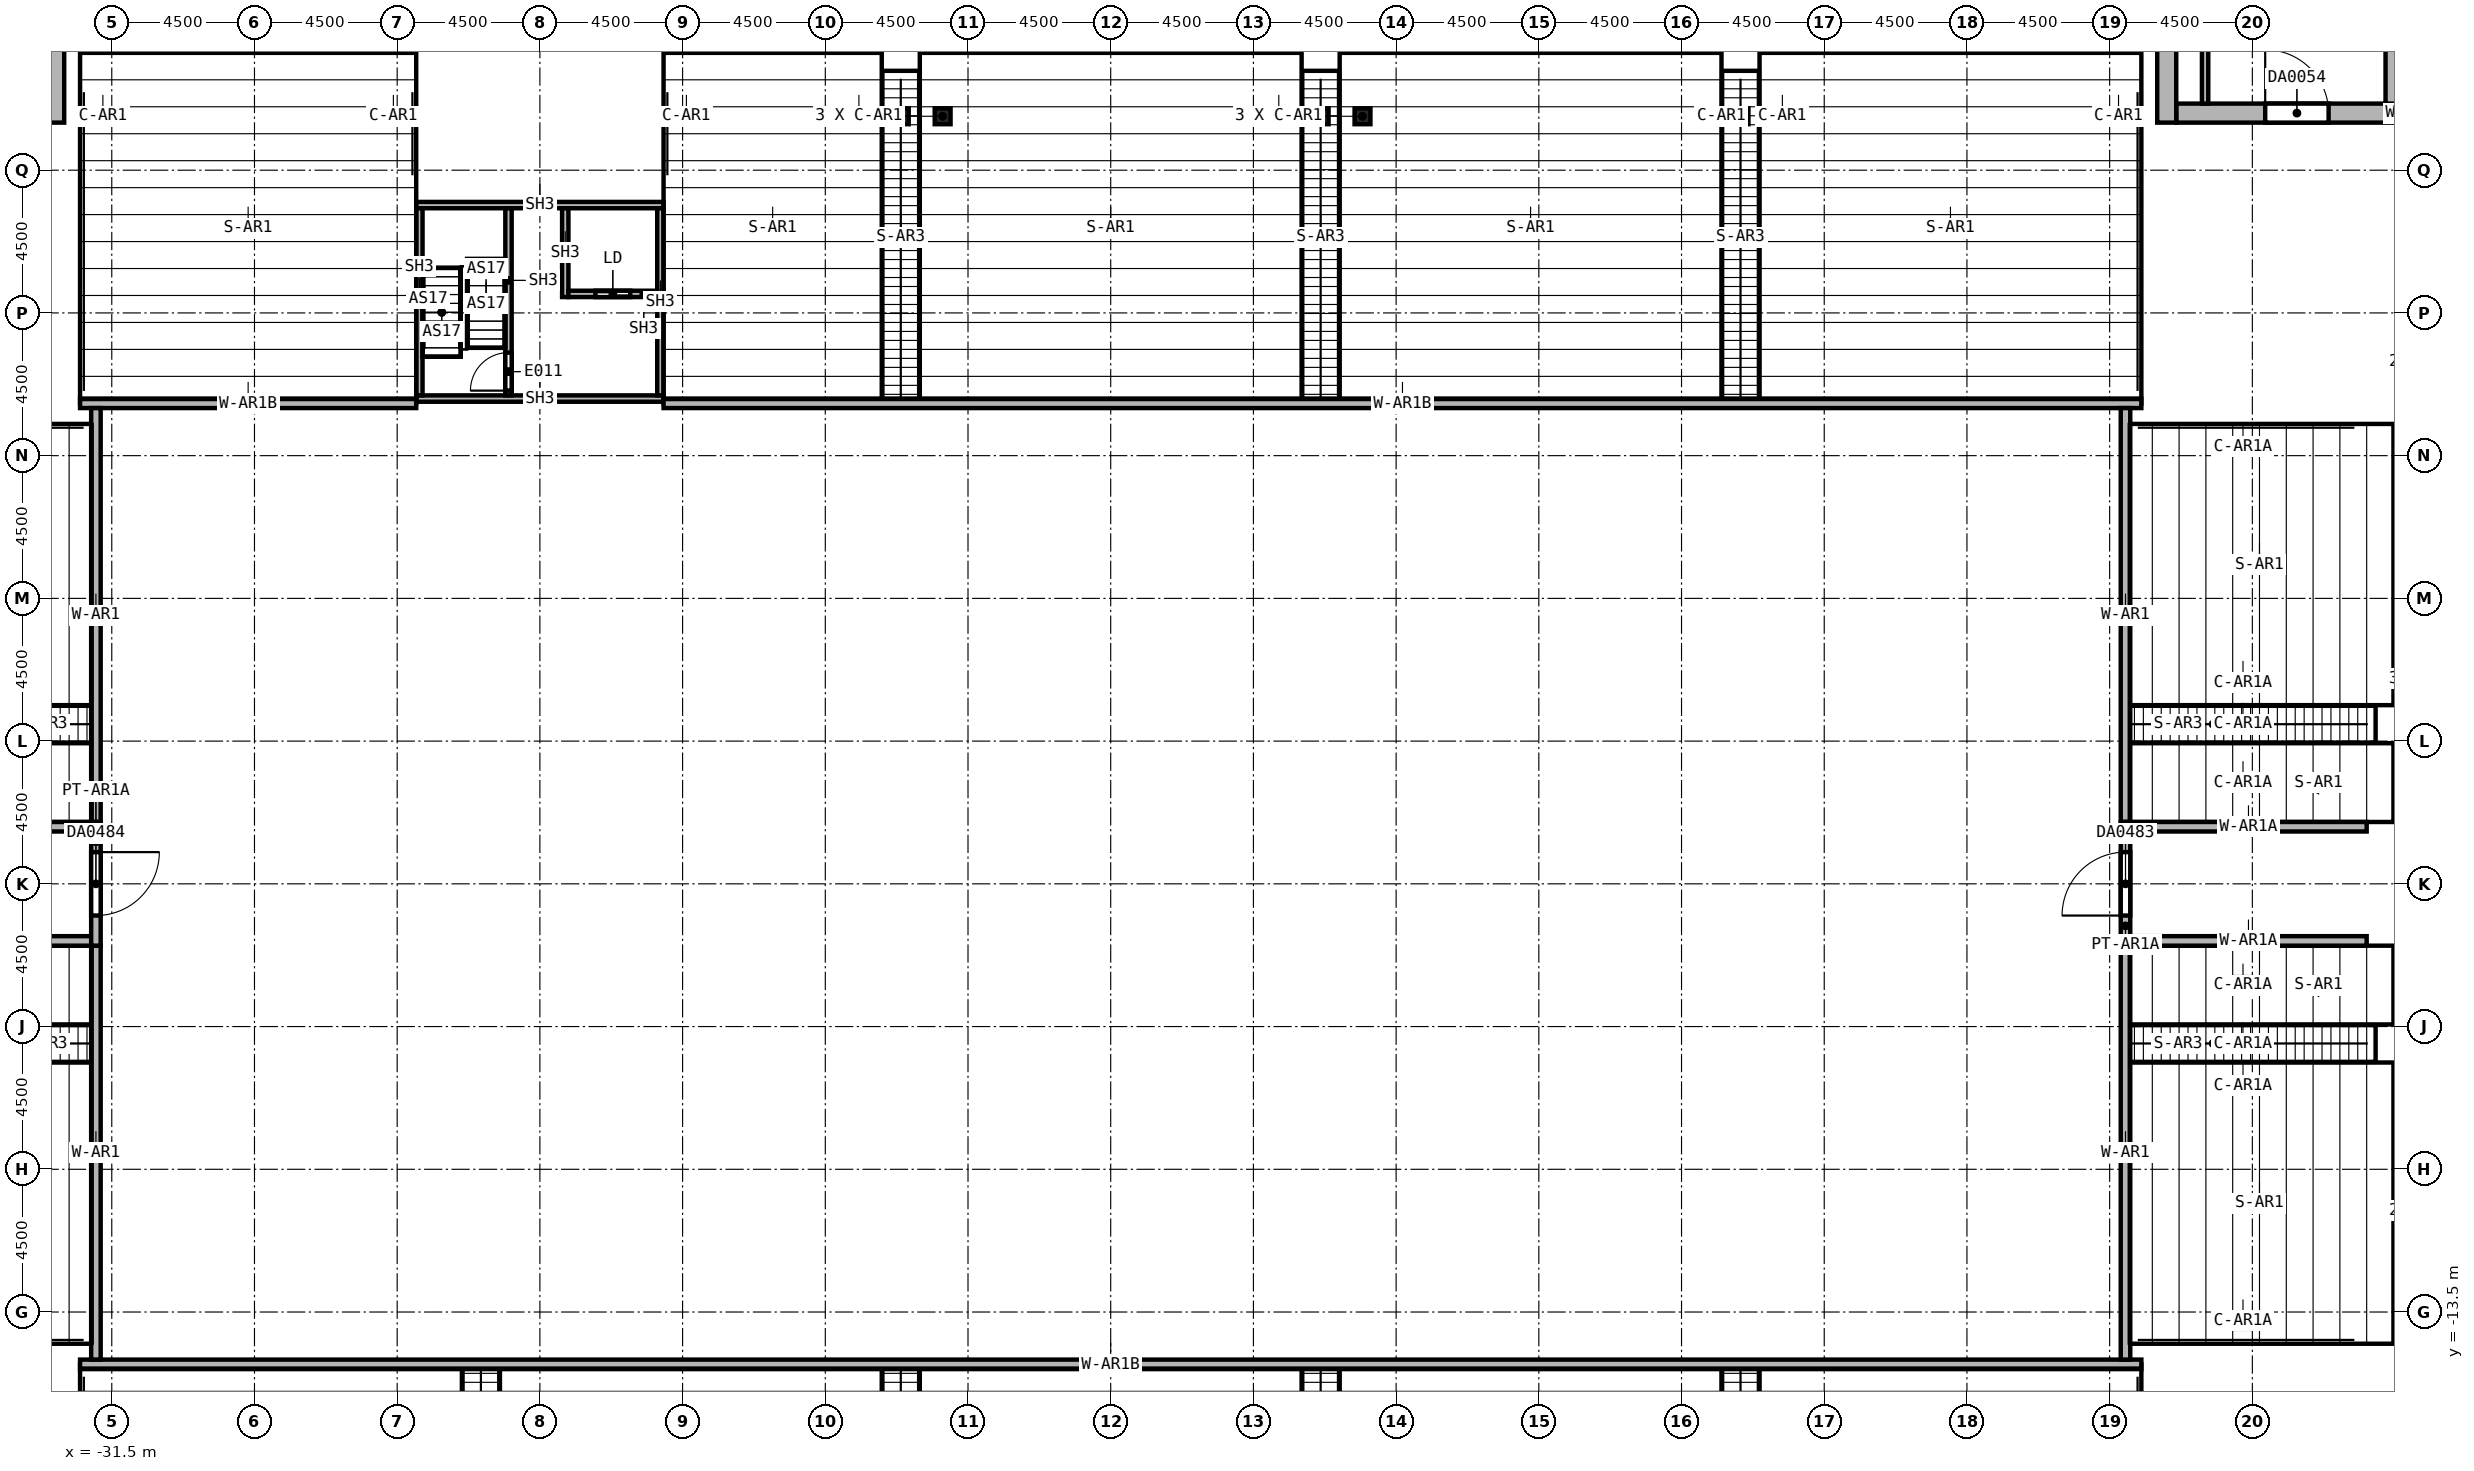
"""IFC4 building model, lengths in metres.
Left out: names, types, materials, properties, quantities, classifications, styles, units other than length and angle.
Written with IfcOpenShell. Run it as: python <this file> out.ifc"""

import sys

from ifc_helpers import new_model, si_unit, direction, frame, frame_2d, origin, origin_2d, place, context, subcontext, project, spatial, rectangle, hollow_rectangle, extrude, element, fill, save


model = new_model("IFC4")
c1 = context("Model", 3, precision=1e-05, world=origin(), true_north=direction((0.0, 1.0)))
c2 = subcontext(c1, "Body", "Model", "MODEL_VIEW")
j1 = project(units=[si_unit("LENGTHUNIT", "METRE"), si_unit("PLANEANGLEUNIT", "RADIAN")], contexts=[c1])
p1 = place(None, origin())
s1 = spatial("IfcSite", under=j1, at=p1, CompositionType="ELEMENT")
p2 = place(p1, origin())
s2 = spatial("IfcBuilding", under=s1, at=p2, CompositionType="ELEMENT")
p3 = place(p2, frame((0.0, 0.0, 12.0)))
s3 = spatial("IfcBuildingStorey", under=s2, at=p3, CompositionType="ELEMENT", Elevation=12.0)
p4 = place(p3, frame((33.6, 24.3, 0.0), z_axis=(0.0, 0.0, 1.0), x_axis=(1.0, 0.0, 0.0)))
e1 = element("IfcWall", 1, at=p4, inside=s3, PredefinedType="SHEAR", context=c2, shape_type="SweptSolid", body=[
    extrude(rectangle(XDim=13.8, YDim=0.6, at=frame_2d((6.9, 0.0))), origin(), (0.0, 0.0, 1.0), 7.0),
])
p5 = place(p4, frame((2.805, 0.0, 0.0)))
e2 = element("IfcOpeningElement", 2, at=p5, cuts=e1, PredefinedType="OPENING", context=c2, shape_type="SweptSolid", body=[
    extrude(rectangle(XDim=2.0, YDim=2.4, at=frame_2d((1.0, 1.2))), frame((0.0, 0.3, 0.0), z_axis=(0.0, -1.0, 0.0), x_axis=(1.0, 0.0, 0.0)), (0.0, 0.0, 1.0), 0.6),
])
p6 = place(p4, frame((8.995, 0.0, 0.0)))
e3 = element("IfcOpeningElement", 3, at=p6, cuts=e1, PredefinedType="OPENING", context=c2, shape_type="SweptSolid", body=[
    extrude(rectangle(XDim=2.0, YDim=2.4, at=frame_2d((1.0, 1.2))), frame((0.0, 0.3, 0.0), z_axis=(0.0, -1.0, 0.0), x_axis=(1.0, 0.0, 0.0)), (0.0, 0.0, 1.0), 0.6),
])
p7 = place(p3, frame((33.3, 24.0, 0.0), z_axis=(0.0, 0.0, 1.0), x_axis=(0.0, 1.0, 0.0)))
e4 = element("IfcWall", 4, at=p7, inside=s3, PredefinedType="SHEAR", context=c2, shape_type="SweptSolid", body=[
    extrude(rectangle(XDim=15.0, YDim=0.6, at=frame_2d((7.5, 0.0))), origin(), (0.0, 0.0, 1.0), 7.0),
])
p8 = place(p7, frame((10.05, 0.0, 0.0)))
e5 = element("IfcOpeningElement", 5, at=p8, cuts=e4, PredefinedType="OPENING", context=c2, shape_type="SweptSolid", body=[
    extrude(rectangle(XDim=2.0, YDim=2.4, at=frame_2d((1.0, 1.2))), frame((0.0, 0.3, 0.0), z_axis=(0.0, -1.0, 0.0), x_axis=(1.0, 0.0, 0.0)), (0.0, 0.0, 1.0), 0.6),
])
p9 = place(p3, frame((40.5, 24.6, 0.0), z_axis=(0.0, 0.0, 1.0), x_axis=(0.0, 1.0, 0.0)))
e6 = element("IfcWall", 6, at=p9, inside=s3, PredefinedType="SHEAR", context=c2, shape_type="SweptSolid", body=[
    extrude(rectangle(XDim=13.8, YDim=0.6, at=frame_2d((6.9, 0.0))), origin(), (0.0, 0.0, 1.0), 7.0),
])
p10 = place(p3, frame((-33.3, 24.0, 0.0), z_axis=(0.0, 0.0, 1.0), x_axis=(0.0, 1.0, 0.0)))
e7 = element("IfcWall", 7, at=p10, inside=s3, PredefinedType="SHEAR", context=c2, shape_type="SweptSolid", body=[
    extrude(rectangle(XDim=15.0, YDim=0.6, at=frame_2d((7.5, 0.0))), origin(), (0.0, 0.0, 1.0), 7.0),
])
p11 = place(p10, frame((10.05, 0.0, 0.0)))
e8 = element("IfcOpeningElement", 8, at=p11, cuts=e7, PredefinedType="OPENING", context=c2, shape_type="SweptSolid", body=[
    extrude(rectangle(XDim=2.0, YDim=2.4, at=frame_2d((1.0, 1.2))), frame((0.0, 0.3, 0.0), z_axis=(0.0, -1.0, 0.0), x_axis=(1.0, 0.0, 0.0)), (0.0, 0.0, 1.0), 0.6),
])
for number, where, z_axis, x_axis in (
    (9, (-21.9, 15.3, 0.0), (0.0, 0.0, 1.0), (1.0, 0.0, 0.0)),
    (10, (-21.9, 21.4, 0.0), (0.0, 0.0, 1.0), (1.0, 0.0, 0.0)),
):
    element("IfcWall", number, at=place(p3, frame(where, z_axis=z_axis, x_axis=x_axis)), inside=s3, PredefinedType="SOLIDWALL", context=c2, shape_type="SweptSolid", body=[
        extrude(rectangle(XDim=7.8, YDim=0.2, at=frame_2d((3.9, 0.0))), origin(), (0.0, 0.0, 1.0), 6.7),
    ])
for number, where, z_axis, x_axis in (
    (11, (-21.8, 15.4, 0.0), (0.0, 0.0, 1.0), (0.0, 1.0, 0.0)),
    (12, (-14.2, 15.4, 0.0), (0.0, 0.0, 1.0), (0.0, 1.0, 0.0)),
):
    element("IfcWall", number, at=place(p3, frame(where, z_axis=z_axis, x_axis=x_axis)), inside=s3, PredefinedType="SOLIDWALL", context=c2, shape_type="SweptSolid", body=[
        extrude(rectangle(XDim=5.9, YDim=0.2, at=frame_2d((2.95, 0.0))), origin(), (0.0, 0.0, 1.0), 6.7),
    ])
p12 = place(p3, frame((-18.99, 15.4, 0.0), z_axis=(0.0, 0.0, 1.0), x_axis=(0.0, 1.0, 0.0)))
e13 = element("IfcWall", 13, at=p12, inside=s3, PredefinedType="SOLIDWALL", context=c2, shape_type="SweptSolid", body=[
    extrude(rectangle(XDim=5.9, YDim=0.2, at=frame_2d((2.95, 0.0))), origin(), (0.0, 0.0, 1.0), 6.7),
])
p13 = place(p12, frame((0.15, 0.0, 0.0)))
e14 = element("IfcOpeningElement", 14, at=p13, cuts=e13, PredefinedType="OPENING", context=c2, shape_type="SweptSolid", body=[
    extrude(rectangle(XDim=1.2, YDim=2.1, at=frame_2d((0.6, 1.05))), frame((0.0, 0.1, 0.0), z_axis=(0.0, -1.0, 0.0), x_axis=(1.0, 0.0, 0.0)), (0.0, 0.0, 1.0), 0.2),
])
p14 = place(p3, frame((-17.2, 18.5, 0.0), z_axis=(0.0, 0.0, 1.0), x_axis=(0.0, 1.0, 0.0)))
e15 = element("IfcWall", 15, at=p14, inside=s3, PredefinedType="SOLIDWALL", context=c2, shape_type="SweptSolid", body=[
    extrude(rectangle(XDim=2.8, YDim=0.2, at=frame_2d((1.4, 0.0))), origin(), (0.0, 0.0, 1.0), 6.7),
])
p15 = place(p3, frame((-17.1, 18.6, 0.0), z_axis=(0.0, 0.0, 1.0), x_axis=(1.0, 0.0, 0.0)))
e16 = element("IfcWall", 16, at=p15, inside=s3, PredefinedType="SOLIDWALL", context=c2, shape_type="SweptSolid", body=[
    extrude(rectangle(XDim=2.8, YDim=0.2, at=frame_2d((1.4, 0.0))), origin(), (0.0, 0.0, 1.0), 6.7),
])
p16 = place(p15, frame((0.85, 0.0, 0.0)))
e17 = element("IfcOpeningElement", 17, at=p16, cuts=e16, PredefinedType="OPENING", context=c2, shape_type="SweptSolid", body=[
    extrude(rectangle(XDim=1.1, YDim=2.1, at=frame_2d((0.55, 1.05))), frame((0.0, 0.1, 0.0), z_axis=(0.0, -1.0, 0.0), x_axis=(1.0, 0.0, 0.0)), (0.0, 0.0, 1.0), 0.2),
])
p17 = place(p3, frame((-32.5, 15.15, 0.0), z_axis=(0.0, 0.0, 1.0), x_axis=(1.0, 0.0, 0.0)))
e18 = element("IfcWall", 18, at=p17, inside=s3, PredefinedType="SOLIDWALL", context=c2, shape_type="SweptSolid", body=[
    extrude(rectangle(XDim=10.6, YDim=0.3, at=frame_2d((5.3, 0.0))), origin(), (0.0, 0.0, 1.0), 2.125),
])
p18 = place(p3, frame((-14.1, 15.15, 0.0), z_axis=(0.0, 0.0, 1.0), x_axis=(1.0, 0.0, 0.0)))
e19 = element("IfcWall", 19, at=p18, inside=s3, PredefinedType="SOLIDWALL", context=c2, shape_type="SweptSolid", body=[
    extrude(rectangle(XDim=46.6, YDim=0.3, at=frame_2d((23.3, 0.0))), origin(), (0.0, 0.0, 1.0), 2.125),
])
p19 = place(p3, frame((32.5, -15.15, 0.0), z_axis=(0.0, 0.0, 1.0), x_axis=(-1.0, 0.0, 0.0)))
e20 = element("IfcWall", 20, at=p19, inside=s3, PredefinedType="SOLIDWALL", context=c2, shape_type="SweptSolid", body=[
    extrude(rectangle(XDim=65.0, YDim=0.3, at=frame_2d((32.5, 0.0))), origin(), (0.0, 0.0, 1.0), 2.125),
])
for number, where, z_axis, x_axis in (
    (21, (32.0, -15.0, 0.0), (0.0, 0.0, 1.0), (0.0, 1.0, 0.0)),
    (22, (32.0, 1.95, 0.0), (0.0, 0.0, 1.0), (0.0, 1.0, 0.0)),
):
    element("IfcWall", number, at=place(p3, frame(where, z_axis=z_axis, x_axis=x_axis)), inside=s3, PredefinedType="SOLIDWALL", context=c2, shape_type="SweptSolid", body=[
        extrude(rectangle(XDim=13.05, YDim=0.3, at=frame_2d((6.525, 0.0))), origin(), (0.0, 0.0, 1.0), 2.0),
    ])
for number, where, z_axis, x_axis in (
    (23, (32.0, -1.8, 0.0), (0.0, 0.0, 1.0), (1.0, 0.0, 0.0)),
    (24, (32.0, 1.8, 0.0), (0.0, 0.0, 1.0), (1.0, 0.0, 0.0)),
):
    element("IfcWall", number, at=place(p3, frame(where, z_axis=z_axis, x_axis=x_axis)), inside=s3, PredefinedType="SOLIDWALL", context=c2, shape_type="SweptSolid", body=[
        extrude(rectangle(XDim=7.605, YDim=0.3, at=frame_2d((3.802, 0.0))), origin(), (0.0, 0.0, 1.0), 7.0),
    ])
for number, where, z_axis, x_axis in (
    (25, (-32.0, 15.0, 0.0), (0.0, 0.0, 1.0), (0.0, -1.0, 0.0)),
    (26, (-32.0, -1.95, 0.0), (0.0, 0.0, 1.0), (0.0, -1.0, 0.0)),
):
    element("IfcWall", number, at=place(p3, frame(where, z_axis=z_axis, x_axis=x_axis)), inside=s3, PredefinedType="SOLIDWALL", context=c2, shape_type="SweptSolid", body=[
        extrude(rectangle(XDim=13.05, YDim=0.3, at=frame_2d((6.525, 0.0))), origin(), (0.0, 0.0, 1.0), 2.0),
    ])
for number, where, z_axis, x_axis in (
    (27, (-32.0, 1.8, 0.0), (0.0, 0.0, 1.0), (-1.0, 0.0, 0.0)),
    (28, (-32.0, -1.8, 0.0), (0.0, 0.0, 1.0), (-1.0, 0.0, 0.0)),
):
    element("IfcWall", number, at=place(p3, frame(where, z_axis=z_axis, x_axis=x_axis)), inside=s3, PredefinedType="SOLIDWALL", context=c2, shape_type="SweptSolid", body=[
        extrude(rectangle(XDim=7.605, YDim=0.3, at=frame_2d((3.802, 0.0))), origin(), (0.0, 0.0, 1.0), 7.0),
    ])
for number, where, z_axis, x_axis in (
    (29, (-31.78, 24.2, 0.0), (0.0, 0.0, 1.0), (1.0, 0.0, 0.0)),
    (30, (-22.62, 24.2, 0.0), (0.0, 0.0, 1.0), (1.0, 0.0, 0.0)),
    (31, (-13.38, 24.2, 0.0), (0.0, 0.0, 1.0), (1.0, 0.0, 0.0)),
    (32, (-7.94, 24.2, 0.0), (0.0, 0.0, 1.0), (1.0, 0.0, 0.0)),
    (33, (-5.3, 24.2, 0.0), (0.0, 0.0, 1.0), (1.0, 0.0, 0.0)),
    (34, (5.3, 24.2, 0.0), (0.0, 0.0, 1.0), (1.0, 0.0, 0.0)),
    (35, (7.94, 24.2, 0.0), (0.0, 0.0, 1.0), (1.0, 0.0, 0.0)),
    (36, (21.18, 24.2, 0.0), (0.0, 0.0, 1.0), (1.0, 0.0, 0.0)),
    (37, (31.78, 24.2, 0.0), (0.0, 0.0, 1.0), (1.0, 0.0, 0.0)),
    (38, (-6.62, 24.2, 0.0), (0.0, 0.0, 1.0), (1.0, 0.0, 0.0)),
    (39, (6.62, 24.2, 0.0), (0.0, 0.0, 1.0), (1.0, 0.0, 0.0)),
    (40, (19.86, 24.2, 0.0), (0.0, 0.0, 1.0), (1.0, 0.0, 0.0)),
):
    element("IfcColumn", number, at=place(p3, frame(where, z_axis=z_axis, x_axis=x_axis)), inside=s3, PredefinedType="COLUMN", context=c2, shape_type="SweptSolid", body=[
        extrude(hollow_rectangle(XDim=0.5, YDim=0.6, WallThickness=0.03, at=origin_2d()), origin(), (0.0, 0.0, 1.0), 5.712),
    ])
for number, where, z_axis, x_axis in (
    (41, (35.705, -13.78, 0.0), (0.0, 0.0, 1.0), (1.0, 0.0, 0.0)),
    (42, (35.705, -6.353, 0.0), (0.0, 0.0, 1.0), (1.0, 0.0, 0.0)),
    (43, (35.705, -3.192, 0.0), (0.0, 0.0, 1.0), (1.0, 0.0, 0.0)),
    (44, (35.705, 3.192, 0.0), (0.0, 0.0, 1.0), (1.0, 0.0, 0.0)),
    (45, (35.705, 6.353, 0.0), (0.0, 0.0, 1.0), (1.0, 0.0, 0.0)),
    (46, (35.705, 13.78, 0.0), (0.0, 0.0, 1.0), (1.0, 0.0, 0.0)),
    (47, (35.705, -5.033, 0.0), (0.0, 0.0, 1.0), (1.0, 0.0, 0.0)),
    (48, (35.705, 5.033, 0.0), (0.0, 0.0, 1.0), (1.0, 0.0, 0.0)),
):
    element("IfcColumn", number, at=place(p3, frame(where, z_axis=z_axis, x_axis=x_axis)), inside=s3, PredefinedType="COLUMN", context=c2, shape_type="SweptSolid", body=[
        extrude(hollow_rectangle(XDim=0.5, YDim=0.6, WallThickness=0.03, at=origin_2d()), origin(), (0.0, 0.0, 1.0), 3.724),
    ])
p20 = place(p3, frame((34.51, 24.6, 0.0), z_axis=(0.0, 0.0, 1.0), x_axis=(0.0, 1.0, 0.0)))
e49 = element("IfcWall", 49, at=p20, inside=s3, PredefinedType="SOLIDWALL", context=c2, shape_type="SweptSolid", body=[
    extrude(rectangle(XDim=9.2, YDim=0.2, at=frame_2d((4.6, 0.0))), origin(), (0.0, 0.0, 1.0), 7.0),
])
p21 = place(p3, frame((32.0, -1.95, 0.0), z_axis=(0.0, 0.0, 1.0), x_axis=(0.0, 1.0, 0.0)))
e50 = element("IfcWall", 50, at=p21, inside=s3, PredefinedType="PARTITIONING", context=c2, shape_type="SweptSolid", body=[
    extrude(rectangle(XDim=3.9, YDim=0.3, at=frame_2d((1.95, 0.0))), origin(), (0.0, 0.0, 1.0), 2.7),
])
p22 = place(p21, frame((0.95, 0.0, 0.0)))
e51 = element("IfcOpeningElement", 51, at=p22, cuts=e50, PredefinedType="OPENING", context=c2, shape_type="SweptSolid", body=[
    extrude(rectangle(XDim=2.0, YDim=2.4, at=frame_2d((1.0, 1.2))), frame((0.0, 0.15, 0.0), z_axis=(0.0, -1.0, 0.0), x_axis=(1.0, 0.0, 0.0)), (0.0, 0.0, 1.0), 0.3),
])
p23 = place(p3, frame((-32.0, 1.95, 0.0), z_axis=(0.0, 0.0, 1.0), x_axis=(0.0, -1.0, 0.0)))
e52 = element("IfcWall", 52, at=p23, inside=s3, PredefinedType="PARTITIONING", context=c2, shape_type="SweptSolid", body=[
    extrude(rectangle(XDim=3.9, YDim=0.3, at=frame_2d((1.95, 0.0))), origin(), (0.0, 0.0, 1.0), 2.7),
])
p24 = place(p23, frame((0.95, 0.0, 0.0)))
e53 = element("IfcOpeningElement", 53, at=p24, cuts=e52, PredefinedType="OPENING", context=c2, shape_type="SweptSolid", body=[
    extrude(rectangle(XDim=2.0, YDim=2.4, at=frame_2d((1.0, 1.2))), frame((0.0, 0.15, 0.0), z_axis=(0.0, -1.0, 0.0), x_axis=(1.0, 0.0, 0.0)), (0.0, 0.0, 1.0), 0.3),
])
p25 = place(p13, origin())
e54 = element("IfcDoor", 54, at=p25, inside=s3, OperationType="SINGLE_SWING_LEFT", PredefinedType="DOOR", context=c2, shape_type="SweptSolid", body=[
    extrude(rectangle(XDim=1.2, YDim=2.1, at=frame_2d((0.6, 1.05))), frame((0.0, 0.025, 0.0), z_axis=(0.0, -1.0, 0.0), x_axis=(1.0, 0.0, 0.0)), (0.0, 0.0, 1.0), 0.05),
])
fill(e14, e54)
p26 = place(p16, origin())
e55 = element("IfcDoor", 55, at=p26, inside=s3, OperationType="SLIDING_TO_LEFT", PredefinedType="DOOR", context=c2, shape_type="SweptSolid", body=[
    extrude(rectangle(XDim=1.1, YDim=2.1, at=frame_2d((0.55, 1.05))), frame((0.0, 0.025, 0.0), z_axis=(0.0, -1.0, 0.0), x_axis=(1.0, 0.0, 0.0)), (0.0, 0.0, 1.0), 0.05),
])
fill(e17, e55)
p27 = place(p5, origin())
e56 = element("IfcDoor", 56, at=p27, inside=s3, OperationType="DOUBLE_DOOR_SINGLE_SWING", PredefinedType="DOOR", context=c2, shape_type="SweptSolid", body=[
    extrude(rectangle(XDim=2.0, YDim=2.4, at=frame_2d((1.0, 1.2))), frame((0.0, 0.025, 0.0), z_axis=(0.0, -1.0, 0.0), x_axis=(1.0, 0.0, 0.0)), (0.0, 0.0, 1.0), 0.05),
])
fill(e2, e56)
p28 = place(p22, frame((2.0, 0.0, 0.0), z_axis=(0.0, 0.0, 1.0), x_axis=(-1.0, 0.0, 0.0)))
e57 = element("IfcDoor", 57, at=p28, inside=s3, OperationType="DOUBLE_DOOR_SINGLE_SWING", PredefinedType="DOOR", context=c2, shape_type="SweptSolid", body=[
    extrude(rectangle(XDim=2.0, YDim=2.4, at=frame_2d((1.0, 1.2))), frame((0.0, 0.025, 0.0), z_axis=(0.0, -1.0, 0.0), x_axis=(1.0, 0.0, 0.0)), (0.0, 0.0, 1.0), 0.05),
])
fill(e51, e57)
p29 = place(p24, frame((2.0, 0.0, 0.0), z_axis=(0.0, 0.0, 1.0), x_axis=(-1.0, 0.0, 0.0)))
e58 = element("IfcDoor", 58, at=p29, inside=s3, OperationType="DOUBLE_DOOR_SINGLE_SWING", PredefinedType="DOOR", context=c2, shape_type="SweptSolid", body=[
    extrude(rectangle(XDim=2.0, YDim=2.4, at=frame_2d((1.0, 1.2))), frame((0.0, 0.025, 0.0), z_axis=(0.0, -1.0, 0.0), x_axis=(1.0, 0.0, 0.0)), (0.0, 0.0, 1.0), 0.05),
])
fill(e53, e58)
save(model, sys.argv[1])
